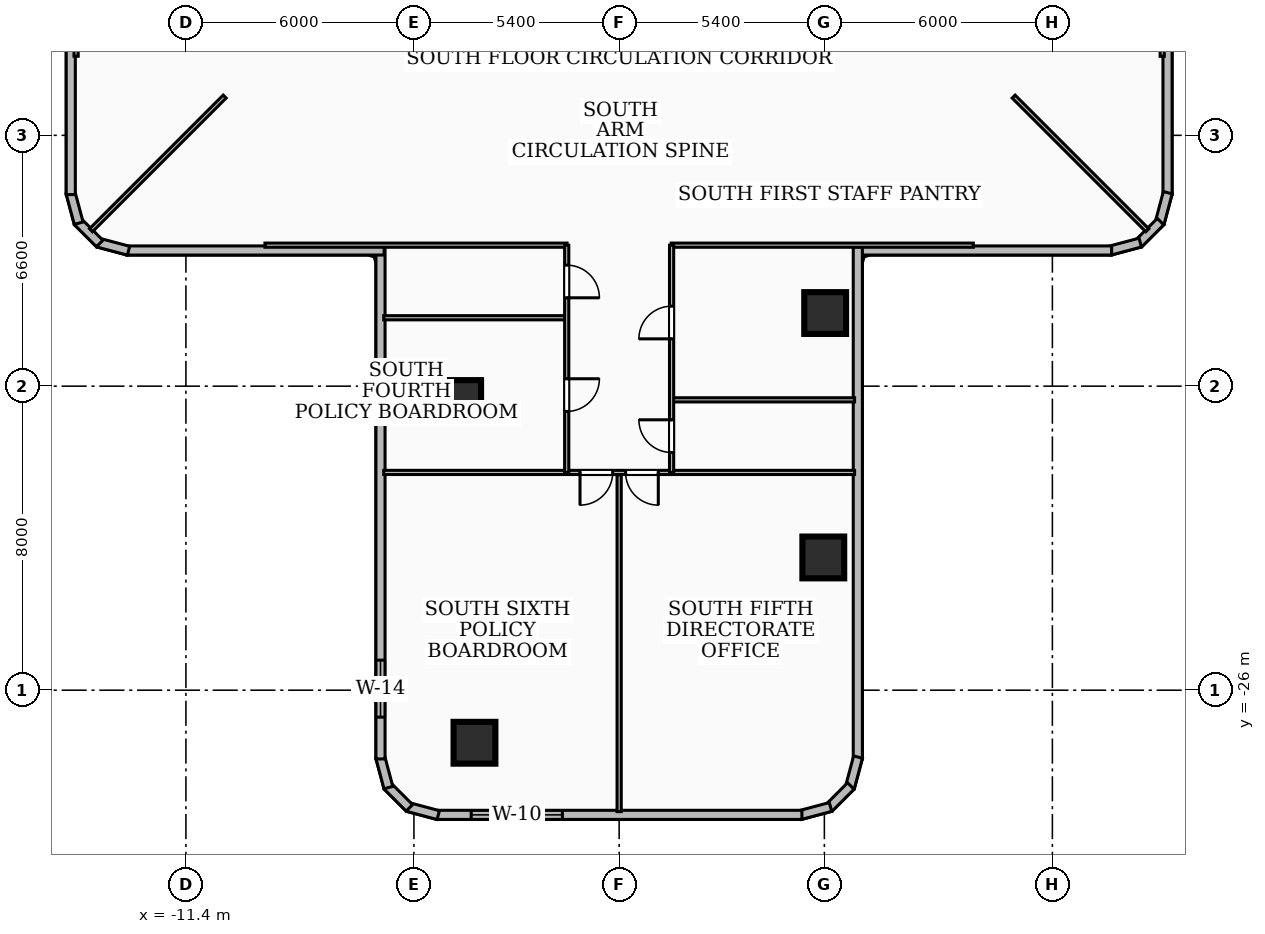
"""IFC4 building model, lengths in metres.
Left out: names, types, materials, properties, quantities, classifications, styles, units other than length and angle.
Written with IfcOpenShell. Run it as: python <this file> out.ifc"""

import sys

from ifc_helpers import new_model, si_unit, direction, frame, frame_2d, origin, origin_2d, place, context, subcontext, project, spatial, rectangle, extrude, element, fill, save


model = new_model("IFC4")
c1 = context("Model", 3, precision=1e-05, world=origin(), true_north=direction((0.0, 1.0)))
c2 = subcontext(c1, "Body", "Model", "MODEL_VIEW")
j1 = project(units=[si_unit("LENGTHUNIT", "METRE"), si_unit("PLANEANGLEUNIT", "RADIAN")], contexts=[c1])
p1 = place(None, origin())
s1 = spatial("IfcSite", under=j1, at=p1, CompositionType="ELEMENT")
p2 = place(p1, origin())
s2 = spatial("IfcBuilding", under=s1, at=p2, CompositionType="ELEMENT")
p3 = place(p2, frame((0.0, 0.0, 28.08)))
s3 = spatial("IfcBuildingStorey", under=s2, at=p3, CompositionType="ELEMENT", Elevation=28.08)
for number, where, z_axis, x_axis in (
    (1, (-4.184, -18.391, 0.0), (0.0, 0.0, 1.0), (1.0, 0.0, 0.0)),
    (2, (5.421, -16.076, 0.0), (0.0, 0.0, 1.0), (1.0, 0.0, 0.0)),
    (3, (-3.807, -27.383, 0.0), (0.0, 0.0, 1.0), (1.0, 0.0, 0.0)),
    (4, (5.372, -22.507, 0.0), (0.0, 0.0, 1.0), (1.0, 0.0, 0.0)),
):
    element("IfcColumn", number, at=place(p3, frame(where, z_axis=z_axis, x_axis=x_axis)), inside=s3, PredefinedType="COLUMN", context=c2, shape_type="SweptSolid", body=[
        extrude(rectangle(XDim=1.1, YDim=1.1, at=origin_2d()), origin(), (0.0, 0.0, 1.0), 3.6),
    ])
p4 = place(p3, frame((14.43, -6.184, 0.0), z_axis=(0.0, 0.0, 1.0), x_axis=(0.0, -1.0, 0.0)))
e5 = element("IfcWall", 5, at=p4, inside=s3, PredefinedType="SOLIDWALL", context=c2, shape_type="SweptSolid", body=[
    extrude(rectangle(XDim=6.775, YDim=0.24, at=frame_2d((3.387, 0.0))), origin(), (0.0, 0.0, 1.0), 3.34),
])
p5 = place(p3, frame((14.436, -12.91, 0.0), z_axis=(0.0, 0.0, 1.0), x_axis=(-0.257937227116, -0.966161677396, 0.0)))
e6 = element("IfcWall", 6, at=p5, inside=s3, PredefinedType="SOLIDWALL", context=c2, shape_type="SweptSolid", body=[
    extrude(rectangle(XDim=0.83, YDim=0.24, at=frame_2d((0.415, 0.0))), origin(), (0.0, 0.0, 1.0), 3.34),
])
p6 = place(p3, frame((14.246, -13.67, 0.0), z_axis=(0.0, 0.0, 1.0), x_axis=(-0.707106781187, -0.707106781187, 0.0)))
e7 = element("IfcWall", 7, at=p6, inside=s3, PredefinedType="SOLIDWALL", context=c2, shape_type="SweptSolid", body=[
    extrude(rectangle(XDim=0.815, YDim=0.24, at=frame_2d((0.407, 0.0))), origin(), (0.0, 0.0, 1.0), 3.34),
])
p7 = place(p3, frame((13.712, -14.222, 0.0), z_axis=(0.0, 0.0, 1.0), x_axis=(-0.966161677396, -0.257937227116, 0.0)))
e8 = element("IfcWall", 8, at=p7, inside=s3, PredefinedType="SOLIDWALL", context=c2, shape_type="SweptSolid", body=[
    extrude(rectangle(XDim=0.83, YDim=0.24, at=frame_2d((0.415, 0.0))), origin(), (0.0, 0.0, 1.0), 3.34),
])
p8 = place(p3, frame((12.959, -14.43, 0.0), z_axis=(0.0, 0.0, 1.0), x_axis=(-1.0, 0.0, 0.0)))
e9 = element("IfcWall", 9, at=p8, inside=s3, PredefinedType="SOLIDWALL", context=c2, shape_type="SweptSolid", body=[
    extrude(rectangle(XDim=6.775, YDim=0.24, at=frame_2d((3.387, 0.0))), origin(), (0.0, 0.0, 1.0), 2.421),
])
p9 = place(p3, frame((6.28, -14.334, 0.0), z_axis=(0.0, 0.0, 1.0), x_axis=(0.0, -1.0, 0.0)))
e10 = element("IfcWall", 10, at=p9, inside=s3, PredefinedType="SOLIDWALL", context=c2, shape_type="SweptSolid", body=[
    extrude(rectangle(XDim=13.475, YDim=0.24, at=frame_2d((6.738, 0.0))), origin(), (0.0, 0.0, 1.0), 2.421),
])
p10 = place(p3, frame((6.286, -27.76, 0.0), z_axis=(0.0, 0.0, 1.0), x_axis=(-0.25766265056, -0.966234939601, 0.0)))
e11 = element("IfcWall", 11, at=p10, inside=s3, PredefinedType="SOLIDWALL", context=c2, shape_type="SweptSolid", body=[
    extrude(rectangle(XDim=0.83, YDim=0.24, at=frame_2d((0.415, 0.0))), origin(), (0.0, 0.0, 1.0), 3.34),
])
p11 = place(p3, frame((6.096, -28.52, 0.0), z_axis=(0.0, 0.0, 1.0), x_axis=(-0.707106781187, -0.707106781187, 0.0)))
e12 = element("IfcWall", 12, at=p11, inside=s3, PredefinedType="SOLIDWALL", context=c2, shape_type="SweptSolid", body=[
    extrude(rectangle(XDim=0.814, YDim=0.24, at=frame_2d((0.407, 0.0))), origin(), (0.0, 0.0, 1.0), 3.34),
])
p12 = place(p3, frame((5.562, -29.072, 0.0), z_axis=(0.0, 0.0, 1.0), x_axis=(-0.966234939601, -0.25766265056, 0.0)))
e13 = element("IfcWall", 13, at=p12, inside=s3, PredefinedType="SOLIDWALL", context=c2, shape_type="SweptSolid", body=[
    extrude(rectangle(XDim=0.83, YDim=0.24, at=frame_2d((0.415, 0.0))), origin(), (0.0, 0.0, 1.0), 3.34),
])
p13 = place(p3, frame((4.809, -29.28, 0.0), z_axis=(0.0, 0.0, 1.0), x_axis=(-1.0, 0.0, 0.0)))
e14 = element("IfcWall", 14, at=p13, inside=s3, PredefinedType="SOLIDWALL", context=c2, shape_type="SweptSolid", body=[
    extrude(rectangle(XDim=9.618, YDim=0.24, at=frame_2d((4.809, 0.0))), origin(), (0.0, 0.0, 1.0), 3.34),
])
p14 = place(p13, frame((6.302, 0.0, 0.85)))
e15 = element("IfcOpeningElement", 15, at=p14, cuts=e14, PredefinedType="OPENING", context=c2, shape_type="SweptSolid", body=[
    extrude(rectangle(XDim=2.4, YDim=1.65, at=frame_2d((1.2, 0.825))), frame((0.0, 0.13, 0.0), z_axis=(0.0, -1.0, 0.0), x_axis=(1.0, 0.0, 0.0)), (0.0, 0.0, 1.0), 0.26),
])
p15 = place(p3, frame((-4.76, -29.286, 0.0), z_axis=(0.0, 0.0, 1.0), x_axis=(-0.966234939601, 0.25766265056, 0.0)))
e16 = element("IfcWall", 16, at=p15, inside=s3, PredefinedType="SOLIDWALL", context=c2, shape_type="SweptSolid", body=[
    extrude(rectangle(XDim=0.83, YDim=0.24, at=frame_2d((0.415, 0.0))), origin(), (0.0, 0.0, 1.0), 3.34),
])
p16 = place(p3, frame((-5.52, -29.096, 0.0), z_axis=(0.0, 0.0, 1.0), x_axis=(-0.707106781187, 0.707106781187, 0.0)))
e17 = element("IfcWall", 17, at=p16, inside=s3, PredefinedType="SOLIDWALL", context=c2, shape_type="SweptSolid", body=[
    extrude(rectangle(XDim=0.814, YDim=0.24, at=frame_2d((0.407, 0.0))), origin(), (0.0, 0.0, 1.0), 3.34),
])
p17 = place(p3, frame((-6.072, -28.562, 0.0), z_axis=(0.0, 0.0, 1.0), x_axis=(-0.25766265056, 0.966234939601, 0.0)))
e18 = element("IfcWall", 18, at=p17, inside=s3, PredefinedType="SOLIDWALL", context=c2, shape_type="SweptSolid", body=[
    extrude(rectangle(XDim=0.83, YDim=0.24, at=frame_2d((0.415, 0.0))), origin(), (0.0, 0.0, 1.0), 3.34),
])
p18 = place(p3, frame((-6.28, -27.809, 0.0), z_axis=(0.0, 0.0, 1.0), x_axis=(0.0, 1.0, 0.0)))
e19 = element("IfcWall", 19, at=p18, inside=s3, PredefinedType="SOLIDWALL", context=c2, shape_type="SweptSolid", body=[
    extrude(rectangle(XDim=13.475, YDim=0.24, at=frame_2d((6.738, 0.0))), origin(), (0.0, 0.0, 1.0), 3.34),
])
p19 = place(p18, frame((1.1, 0.0, 0.85)))
e20 = element("IfcOpeningElement", 20, at=p19, cuts=e19, PredefinedType="OPENING", context=c2, shape_type="SweptSolid", body=[
    extrude(rectangle(XDim=1.5, YDim=1.5, at=frame_2d((0.75, 0.75))), frame((0.0, 0.13, 0.0), z_axis=(0.0, -1.0, 0.0), x_axis=(1.0, 0.0, 0.0)), (0.0, 0.0, 1.0), 0.26),
])
p20 = place(p3, frame((-6.184, -14.43, 0.0), z_axis=(0.0, 0.0, 1.0), x_axis=(-1.0, 0.0, 0.0)))
e21 = element("IfcWall", 21, at=p20, inside=s3, PredefinedType="SOLIDWALL", context=c2, shape_type="SweptSolid", body=[
    extrude(rectangle(XDim=6.775, YDim=0.24, at=frame_2d((3.387, 0.0))), origin(), (0.0, 0.0, 1.0), 3.34),
])
p21 = place(p3, frame((-12.91, -14.436, 0.0), z_axis=(0.0, 0.0, 1.0), x_axis=(-0.966161677396, 0.257937227116, 0.0)))
e22 = element("IfcWall", 22, at=p21, inside=s3, PredefinedType="SOLIDWALL", context=c2, shape_type="SweptSolid", body=[
    extrude(rectangle(XDim=0.83, YDim=0.24, at=frame_2d((0.415, 0.0))), origin(), (0.0, 0.0, 1.0), 3.34),
])
p22 = place(p3, frame((-13.67, -14.246, 0.0), z_axis=(0.0, 0.0, 1.0), x_axis=(-0.707106781187, 0.707106781187, 0.0)))
e23 = element("IfcWall", 23, at=p22, inside=s3, PredefinedType="SOLIDWALL", context=c2, shape_type="SweptSolid", body=[
    extrude(rectangle(XDim=0.815, YDim=0.24, at=frame_2d((0.407, 0.0))), origin(), (0.0, 0.0, 1.0), 3.34),
])
p23 = place(p3, frame((-14.222, -13.712, 0.0), z_axis=(0.0, 0.0, 1.0), x_axis=(-0.257937227116, 0.966161677396, 0.0)))
e24 = element("IfcWall", 24, at=p23, inside=s3, PredefinedType="SOLIDWALL", context=c2, shape_type="SweptSolid", body=[
    extrude(rectangle(XDim=0.83, YDim=0.24, at=frame_2d((0.415, 0.0))), origin(), (0.0, 0.0, 1.0), 3.34),
])
p24 = place(p3, frame((-14.43, -12.959, 0.0), z_axis=(0.0, 0.0, 1.0), x_axis=(0.0, 1.0, 0.0)))
e25 = element("IfcWall", 25, at=p24, inside=s3, PredefinedType="SOLIDWALL", context=c2, shape_type="SweptSolid", body=[
    extrude(rectangle(XDim=6.775, YDim=0.24, at=frame_2d((3.387, 0.0))), origin(), (0.0, 0.0, 1.0), 3.34),
])
for number, where, z_axis, x_axis in (
    (26, (-10.38, -10.38, 0.0), (0.0, 0.0, 1.0), (-0.707, -0.707, 0.0)),
    (27, (10.38, -10.38, 0.0), (0.0, 0.0, 1.0), (0.707, -0.707, 0.0)),
):
    element("IfcWall", number, at=place(p3, frame(where, z_axis=z_axis, x_axis=x_axis)), inside=s3, PredefinedType="PARTITIONING", context=c2, shape_type="SweptSolid", body=[
        extrude(rectangle(XDim=4.975, YDim=0.11, at=frame_2d((2.488, 0.0))), origin(), (0.0, 0.0, 1.0), 3.34),
    ])
for number, where, z_axis, x_axis in (
    (28, (14.29, -9.32, 0.0), (0.0, 0.0, 1.0), (0.0, 1.0, 0.0)),
    (29, (-14.29, -1.37, 0.0), (0.0, 0.0, 1.0), (0.0, -1.0, 0.0)),
    (30, (1.37, -14.29, 0.0), (0.0, 0.0, 1.0), (1.0, 0.0, 0.0)),
    (31, (-9.32, -14.29, 0.0), (0.0, 0.0, 1.0), (1.0, 0.0, 0.0)),
):
    element("IfcWall", number, at=place(p3, frame(where, z_axis=z_axis, x_axis=x_axis)), inside=s3, PredefinedType="PARTITIONING", context=c2, shape_type="SweptSolid", body=[
        extrude(rectangle(XDim=7.95, YDim=0.11, at=frame_2d((3.975, 0.0))), origin(), (0.0, 0.0, 1.0), 2.421),
    ])
for number, where, z_axis, x_axis in (
    (32, (1.4, -18.36, 0.0), (0.0, 0.0, 1.0), (1.0, 0.0, 0.0)),
    (33, (-6.195, -16.2, 0.0), (0.0, 0.0, 1.0), (1.0, 0.0, 0.0)),
):
    element("IfcWall", number, at=place(p3, frame(where, z_axis=z_axis, x_axis=x_axis)), inside=s3, PredefinedType="PARTITIONING", context=c2, shape_type="SweptSolid", body=[
        extrude(rectangle(XDim=4.795, YDim=0.11, at=frame_2d((2.397, 0.0))), origin(), (0.0, 0.0, 1.0), 2.421),
    ])
p25 = place(p3, frame((1.38, -20.27, 0.0), z_axis=(0.0, 0.0, 1.0), x_axis=(0.0, 1.0, 0.0)))
e34 = element("IfcWall", 34, at=p25, inside=s3, PredefinedType="PARTITIONING", context=c2, shape_type="SweptSolid", body=[
    extrude(rectangle(XDim=5.98, YDim=0.11, at=frame_2d((2.99, 0.0))), origin(), (0.0, 0.0, 1.0), 2.869),
])
p26 = place(p25, frame((3.515, 0.0, 0.0)))
e35 = element("IfcOpeningElement", 35, at=p26, cuts=e34, PredefinedType="OPENING", context=c2, shape_type="SweptSolid", body=[
    extrude(rectangle(XDim=0.86, YDim=2.04, at=frame_2d((0.43, 1.02))), frame((0.0, 0.065, 0.0), z_axis=(0.0, -1.0, 0.0), x_axis=(1.0, 0.0, 0.0)), (0.0, 0.0, 1.0), 0.13),
])
p27 = place(p25, frame((0.525, 0.0, 0.0)))
e36 = element("IfcOpeningElement", 36, at=p27, cuts=e34, PredefinedType="OPENING", context=c2, shape_type="SweptSolid", body=[
    extrude(rectangle(XDim=0.86, YDim=2.04, at=frame_2d((0.43, 1.02))), frame((0.0, 0.065, 0.0), z_axis=(0.0, -1.0, 0.0), x_axis=(1.0, 0.0, 0.0)), (0.0, 0.0, 1.0), 0.13),
])
p28 = place(p3, frame((-1.38, -14.29, 0.0), z_axis=(0.0, 0.0, 1.0), x_axis=(0.0, -1.0, 0.0)))
e37 = element("IfcWall", 37, at=p28, inside=s3, PredefinedType="PARTITIONING", context=c2, shape_type="SweptSolid", body=[
    extrude(rectangle(XDim=5.98, YDim=0.11, at=frame_2d((2.99, 0.0))), origin(), (0.0, 0.0, 1.0), 2.869),
])
p29 = place(p28, frame((0.525, 0.0, 0.0)))
e38 = element("IfcOpeningElement", 38, at=p29, cuts=e37, PredefinedType="OPENING", context=c2, shape_type="SweptSolid", body=[
    extrude(rectangle(XDim=0.86, YDim=2.04, at=frame_2d((0.43, 1.02))), frame((0.0, 0.065, 0.0), z_axis=(0.0, -1.0, 0.0), x_axis=(1.0, 0.0, 0.0)), (0.0, 0.0, 1.0), 0.13),
])
p30 = place(p28, frame((3.515, 0.0, 0.0)))
e39 = element("IfcOpeningElement", 39, at=p30, cuts=e37, PredefinedType="OPENING", context=c2, shape_type="SweptSolid", body=[
    extrude(rectangle(XDim=0.86, YDim=2.04, at=frame_2d((0.43, 1.02))), frame((0.0, 0.065, 0.0), z_axis=(0.0, -1.0, 0.0), x_axis=(1.0, 0.0, 0.0)), (0.0, 0.0, 1.0), 0.13),
])
p31 = place(p3, frame((0.0, -20.33, 0.0), z_axis=(0.0, 0.0, 1.0), x_axis=(0.0, -1.0, 0.0)))
e40 = element("IfcWall", 40, at=p31, inside=s3, PredefinedType="PARTITIONING", context=c2, shape_type="SweptSolid", body=[
    extrude(rectangle(XDim=8.865, YDim=0.11, at=frame_2d((4.433, 0.0))), origin(), (0.0, 0.0, 1.0), 2.72),
])
p32 = place(p3, frame((6.195, -20.27, 0.0), z_axis=(0.0, 0.0, 1.0), x_axis=(-1.0, 0.0, 0.0)))
e41 = element("IfcWall", 41, at=p32, inside=s3, PredefinedType="PARTITIONING", context=c2, shape_type="SweptSolid", body=[
    extrude(rectangle(XDim=12.39, YDim=0.11, at=frame_2d((6.195, 0.0))), origin(), (0.0, 0.0, 1.0), 2.421),
])
p33 = place(p32, frame((6.365, 0.0, 0.0)))
e42 = element("IfcOpeningElement", 42, at=p33, cuts=e41, PredefinedType="OPENING", context=c2, shape_type="SweptSolid", body=[
    extrude(rectangle(XDim=0.86, YDim=2.04, at=frame_2d((0.43, 1.02))), frame((0.0, 0.065, 0.0), z_axis=(0.0, -1.0, 0.0), x_axis=(1.0, 0.0, 0.0)), (0.0, 0.0, 1.0), 0.13),
])
p34 = place(p32, frame((5.165, 0.0, 0.0)))
e43 = element("IfcOpeningElement", 43, at=p34, cuts=e41, PredefinedType="OPENING", context=c2, shape_type="SweptSolid", body=[
    extrude(rectangle(XDim=0.86, YDim=2.04, at=frame_2d((0.43, 1.02))), frame((0.0, 0.065, 0.0), z_axis=(0.0, -1.0, 0.0), x_axis=(1.0, 0.0, 0.0)), (0.0, 0.0, 1.0), 0.13),
])
p35 = place(p14, origin())
e44 = element("IfcWindow", 44, at=p35, inside=s3, PartitioningType="SINGLE_PANEL", PredefinedType="WINDOW", context=c2, shape_type="SweptSolid", body=[
    extrude(rectangle(XDim=2.4, YDim=1.65, at=frame_2d((1.2, 0.825))), frame((0.0, 0.03, 0.0), z_axis=(0.0, -1.0, 0.0), x_axis=(1.0, 0.0, 0.0)), (0.0, 0.0, 1.0), 0.06),
])
fill(e15, e44)
p36 = place(p19, origin())
e45 = element("IfcWindow", 45, at=p36, inside=s3, PartitioningType="SINGLE_PANEL", PredefinedType="WINDOW", context=c2, shape_type="SweptSolid", body=[
    extrude(rectangle(XDim=1.5, YDim=1.5, at=frame_2d((0.75, 0.75))), frame((0.0, 0.03, 0.0), z_axis=(0.0, -1.0, 0.0), x_axis=(1.0, 0.0, 0.0)), (0.0, 0.0, 1.0), 0.06),
])
fill(e20, e45)
p37 = place(p26, origin())
e46 = element("IfcDoor", 46, at=p37, inside=s3, OperationType="SINGLE_SWING_LEFT", PredefinedType="DOOR", context=c2, shape_type="SweptSolid", body=[
    extrude(rectangle(XDim=0.86, YDim=2.04, at=frame_2d((0.43, 1.02))), frame((0.0, 0.025, 0.0), z_axis=(0.0, -1.0, 0.0), x_axis=(1.0, 0.0, 0.0)), (0.0, 0.0, 1.0), 0.05),
])
fill(e35, e46)
p38 = place(p27, origin())
e47 = element("IfcDoor", 47, at=p38, inside=s3, OperationType="SINGLE_SWING_RIGHT", PredefinedType="DOOR", context=c2, shape_type="SweptSolid", body=[
    extrude(rectangle(XDim=0.86, YDim=2.04, at=frame_2d((0.43, 1.02))), frame((0.0, 0.025, 0.0), z_axis=(0.0, -1.0, 0.0), x_axis=(1.0, 0.0, 0.0)), (0.0, 0.0, 1.0), 0.05),
])
fill(e36, e47)
p39 = place(p29, origin())
e48 = element("IfcDoor", 48, at=p39, inside=s3, OperationType="SINGLE_SWING_RIGHT", PredefinedType="DOOR", context=c2, shape_type="SweptSolid", body=[
    extrude(rectangle(XDim=0.86, YDim=2.04, at=frame_2d((0.43, 1.02))), frame((0.0, 0.025, 0.0), z_axis=(0.0, -1.0, 0.0), x_axis=(1.0, 0.0, 0.0)), (0.0, 0.0, 1.0), 0.05),
])
fill(e38, e48)
p40 = place(p30, origin())
e49 = element("IfcDoor", 49, at=p40, inside=s3, OperationType="SINGLE_SWING_LEFT", PredefinedType="DOOR", context=c2, shape_type="SweptSolid", body=[
    extrude(rectangle(XDim=0.86, YDim=2.04, at=frame_2d((0.43, 1.02))), frame((0.0, 0.025, 0.0), z_axis=(0.0, -1.0, 0.0), x_axis=(1.0, 0.0, 0.0)), (0.0, 0.0, 1.0), 0.05),
])
fill(e39, e49)
p41 = place(p33, origin())
e50 = element("IfcDoor", 50, at=p41, inside=s3, OperationType="SINGLE_SWING_RIGHT", PredefinedType="DOOR", context=c2, shape_type="SweptSolid", body=[
    extrude(rectangle(XDim=0.86, YDim=2.04, at=frame_2d((0.43, 1.02))), frame((0.0, 0.025, 0.0), z_axis=(0.0, -1.0, 0.0), x_axis=(1.0, 0.0, 0.0)), (0.0, 0.0, 1.0), 0.05),
])
fill(e42, e50)
p42 = place(p34, origin())
e51 = element("IfcDoor", 51, at=p42, inside=s3, OperationType="SINGLE_SWING_LEFT", PredefinedType="DOOR", context=c2, shape_type="SweptSolid", body=[
    extrude(rectangle(XDim=0.86, YDim=2.04, at=frame_2d((0.43, 1.02))), frame((0.0, 0.025, 0.0), z_axis=(0.0, -1.0, 0.0), x_axis=(1.0, 0.0, 0.0)), (0.0, 0.0, 1.0), 0.05),
])
fill(e43, e51)
save(model, sys.argv[1])
